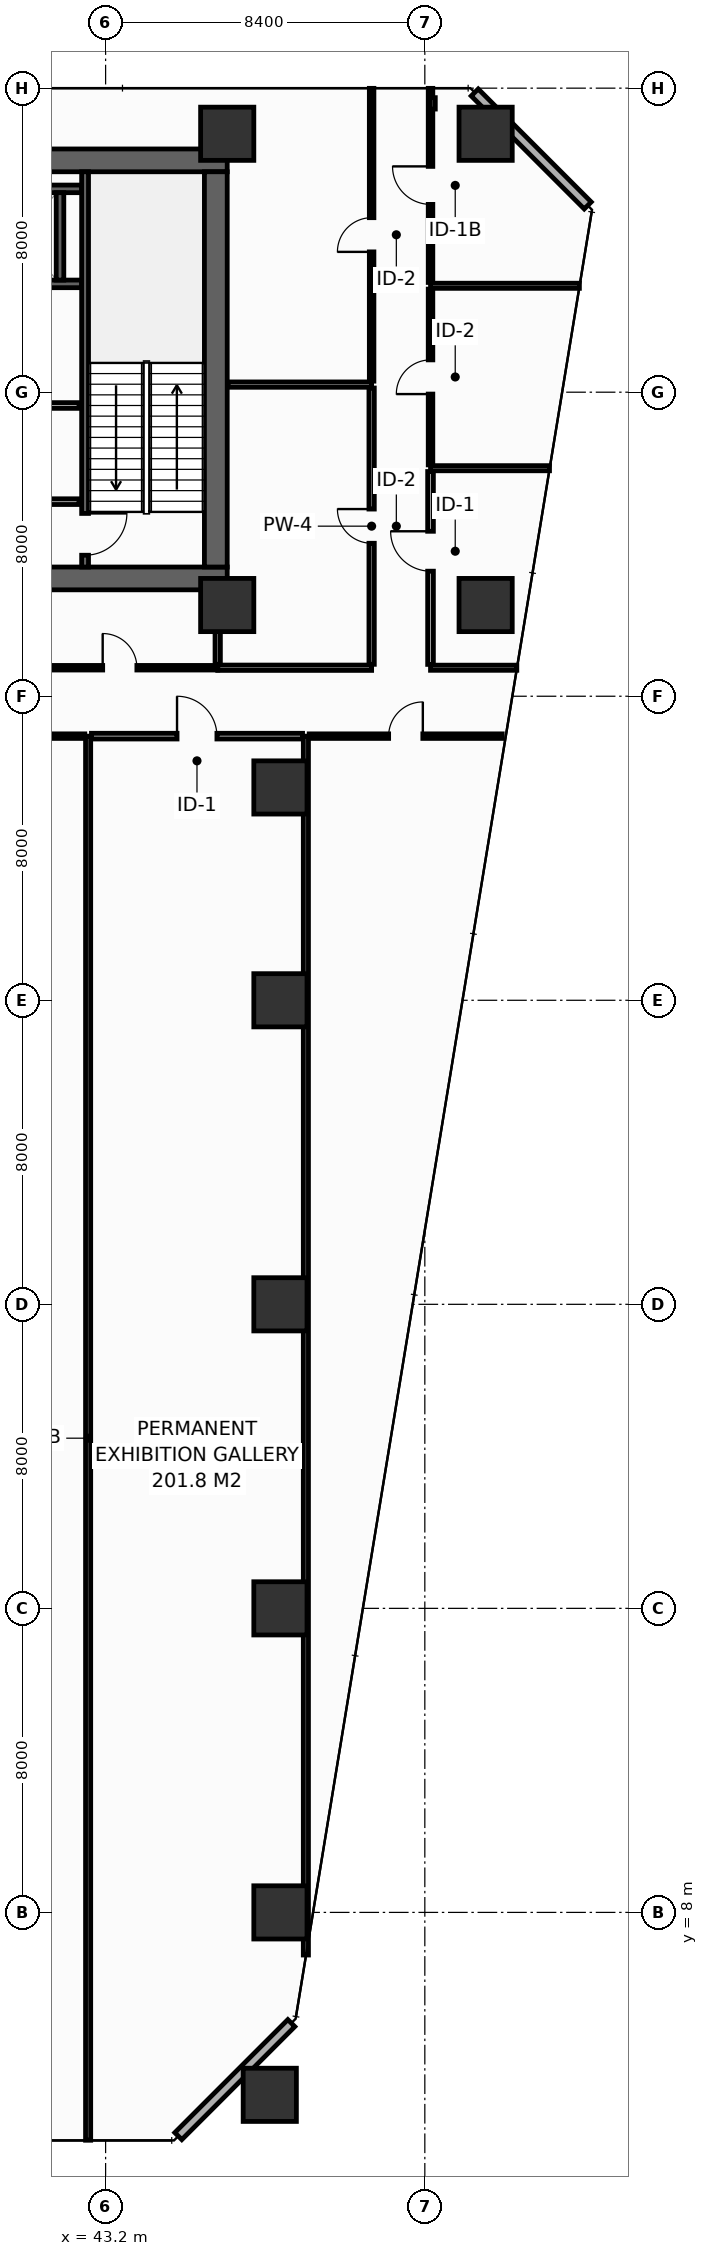
"""IFC4 building model, lengths in metres.
Left out: names, types, materials, properties, quantities, classifications, styles, units other than length and angle.
Written with IfcOpenShell. Run it as: python <this file> out.ifc"""

import sys

from ifc_helpers import new_model, si_unit, direction, frame, frame_2d, origin, origin_2d, place, context, subcontext, project, spatial, rectangle, hollow_rectangle, extrude, element, fill, save


model = new_model("IFC4")
c1 = context("Model", 3, precision=1e-05, world=origin(), true_north=direction((0.0, 1.0)))
c2 = subcontext(c1, "Body", "Model", "MODEL_VIEW")
j1 = project(units=[si_unit("LENGTHUNIT", "METRE"), si_unit("PLANEANGLEUNIT", "RADIAN")], contexts=[c1])
p1 = place(None, origin())
s1 = spatial("IfcSite", under=j1, at=p1, CompositionType="ELEMENT")
p2 = place(p1, origin())
s2 = spatial("IfcBuilding", under=s1, at=p2, CompositionType="ELEMENT")
p3 = place(p2, frame((0.0, 0.0, 33.0)))
s3 = spatial("IfcBuildingStorey", under=s2, at=p3, CompositionType="ELEMENT", Elevation=33.0)
p4 = place(p3, frame((13.5, 43.1, 0.0), z_axis=(0.0, 0.0, 1.0), x_axis=(1.0, 0.0, 0.0)))
e1 = element("IfcWall", 1, at=p4, inside=s3, PredefinedType="SHEAR", context=c2, shape_type="SweptSolid", body=[
    extrude(rectangle(XDim=32.9, YDim=0.6, at=frame_2d((16.45, 0.0))), origin(), (0.0, 0.0, 1.0), 4.95),
])
p5 = place(p4, frame((5.4, 0.0, 0.0)))
e2 = element("IfcOpeningElement", 2, at=p5, cuts=e1, PredefinedType="OPENING", context=c2, shape_type="SweptSolid", body=[
    extrude(rectangle(XDim=1.1, YDim=2.15, at=frame_2d((0.55, 1.075))), frame((0.0, 0.31, 0.0), z_axis=(0.0, -1.0, 0.0), x_axis=(1.0, 0.0, 0.0)), (0.0, 0.0, 1.0), 0.62),
])
p6 = place(p4, frame((25.6, 0.0, 0.0)))
e3 = element("IfcOpeningElement", 3, at=p6, cuts=e1, PredefinedType="OPENING", context=c2, shape_type="SweptSolid", body=[
    extrude(rectangle(XDim=1.1, YDim=2.15, at=frame_2d((0.55, 1.075))), frame((0.0, 0.31, 0.0), z_axis=(0.0, -1.0, 0.0), x_axis=(1.0, 0.0, 0.0)), (0.0, 0.0, 1.0), 0.62),
])
p7 = place(p3, frame((13.5, 54.1, 0.0), z_axis=(0.0, 0.0, 1.0), x_axis=(1.0, 0.0, 0.0)))
e4 = element("IfcWall", 4, at=p7, inside=s3, PredefinedType="SHEAR", context=c2, shape_type="SweptSolid", body=[
    extrude(rectangle(XDim=32.9, YDim=0.6, at=frame_2d((16.45, 0.0))), origin(), (0.0, 0.0, 1.0), 4.95),
])
p8 = place(p3, frame((46.1, 43.4, 0.0), z_axis=(0.0, 0.0, 1.0), x_axis=(0.0, 1.0, 0.0)))
e5 = element("IfcWall", 5, at=p8, inside=s3, PredefinedType="SHEAR", context=c2, shape_type="SweptSolid", body=[
    extrude(rectangle(XDim=10.4, YDim=0.6, at=frame_2d((5.2, 0.0))), origin(), (0.0, 0.0, 1.0), 4.95),
])
for number, where, z_axis, x_axis in (
    (6, (46.4, 54.8, 0.0), (0.0, 0.0, 1.0), (1.0, 0.0, 0.0)),
    (7, (53.2, 54.8, 0.0), (0.0, 0.0, 1.0), (1.0, 0.0, 0.0)),
    (8, (46.4, 42.4, 0.0), (0.0, 0.0, 1.0), (1.0, 0.0, 0.0)),
    (9, (53.2, 42.4, 0.0), (0.0, 0.0, 1.0), (1.0, 0.0, 0.0)),
    (10, (47.52, 3.2, 0.0), (0.0, 0.0, 1.0), (1.0, 0.0, 0.0)),
    (11, (47.8, 8.0, 0.0), (0.0, 0.0, 1.0), (1.0, 0.0, 0.0)),
    (12, (47.8, 16.0, 0.0), (0.0, 0.0, 1.0), (1.0, 0.0, 0.0)),
    (13, (47.8, 24.0, 0.0), (0.0, 0.0, 1.0), (1.0, 0.0, 0.0)),
    (14, (47.8, 32.0, 0.0), (0.0, 0.0, 1.0), (1.0, 0.0, 0.0)),
    (15, (47.8, 37.6, 0.0), (0.0, 0.0, 1.0), (1.0, 0.0, 0.0)),
):
    element("IfcColumn", number, at=place(p3, frame(where, z_axis=z_axis, x_axis=x_axis)), inside=s3, PredefinedType="COLUMN", context=c2, shape_type="SweptSolid", body=[
        extrude(hollow_rectangle(XDim=1.4, YDim=1.4, WallThickness=0.065, at=origin_2d()), origin(), (0.0, 0.0, 1.0), 5.4),
    ])
p9 = place(p3, frame((51.8, 55.6, 0.0), z_axis=(0.0, 0.0, 1.0), x_axis=(1.0, 0.0, 0.0)))
e16 = element("IfcColumn", 16, at=p9, inside=s3, PredefinedType="PILASTER", context=c2, shape_type="SweptSolid", body=[
    extrude(hollow_rectangle(XDim=0.15, YDim=0.3, WallThickness=0.01, at=origin_2d()), origin(), (0.0, 0.0, 1.0), 5.4),
])
for number, where, z_axis, x_axis in (
    (17, (39.525, 50.85, 0.0), (0.0, 0.0, 1.0), (1.0, 0.0, 0.0)),
    (18, (39.525, 53.35, 0.0), (0.0, 0.0, 1.0), (1.0, 0.0, 0.0)),
):
    element("IfcWall", number, at=place(p3, frame(where, z_axis=z_axis, x_axis=x_axis)), inside=s3, PredefinedType="SHEAR", context=c2, shape_type="SweptSolid", body=[
        extrude(rectangle(XDim=3.045, YDim=0.2, at=frame_2d((1.522, 0.0))), origin(), (0.0, 0.0, 1.0), 4.95),
    ])
p10 = place(p3, frame((42.0, 50.95, 0.0), z_axis=(0.0, 0.0, 1.0), x_axis=(0.0, 1.0, 0.0)))
e19 = element("IfcWall", 19, at=p10, inside=s3, PredefinedType="SHEAR", context=c2, shape_type="SweptSolid", body=[
    extrude(rectangle(XDim=2.3, YDim=0.2, at=frame_2d((1.15, 0.0))), origin(), (0.0, 0.0, 1.0), 4.95),
])
p11 = place(p3, frame((42.66, 53.8, 0.0), z_axis=(0.0, 0.0, 1.0), x_axis=(0.0, -1.0, 0.0)))
e20 = element("IfcWall", 20, at=p11, inside=s3, PredefinedType="SHEAR", context=c2, shape_type="SweptSolid", body=[
    extrude(rectangle(XDim=10.4, YDim=0.18, at=frame_2d((5.2, 0.0))), origin(), (0.0, 0.0, 1.0), 4.95),
])
p12 = place(p11, frame((8.99, 0.0, 0.0)))
e21 = element("IfcOpeningElement", 21, at=p12, cuts=e20, PredefinedType="OPENING", context=c2, shape_type="SweptSolid", body=[
    extrude(rectangle(XDim=1.1, YDim=2.15, at=frame_2d((0.55, 1.075))), frame((0.0, 0.1, 0.0), z_axis=(0.0, -1.0, 0.0), x_axis=(1.0, 0.0, 0.0)), (0.0, 0.0, 1.0), 0.2),
])
p13 = place(p3, frame((33.95, 45.12, 0.0), z_axis=(0.0, 0.0, 1.0), x_axis=(1.0, 0.0, 0.0)))
e22 = element("IfcWall", 22, at=p13, inside=s3, PredefinedType="PARTITIONING", context=c2, shape_type="SweptSolid", body=[
    extrude(rectangle(XDim=8.55, YDim=0.15, at=frame_2d((4.275, 0.0))), origin(), (0.0, 0.0, 1.0), 4.95),
])
p14 = place(p13, frame((0.95, 0.0, 0.0)))
e23 = element("IfcOpeningElement", 23, at=p14, cuts=e22, PredefinedType="OPENING", context=c2, shape_type="SweptSolid", body=[
    extrude(rectangle(XDim=0.95, YDim=2.15, at=frame_2d((0.475, 1.075))), frame((0.0, 0.085, 0.0), z_axis=(0.0, -1.0, 0.0), x_axis=(1.0, 0.0, 0.0)), (0.0, 0.0, 1.0), 0.17),
])
p15 = place(p13, frame((3.8, 0.0, 0.0)))
e24 = element("IfcOpeningElement", 24, at=p15, cuts=e22, PredefinedType="OPENING", context=c2, shape_type="SweptSolid", body=[
    extrude(rectangle(XDim=0.95, YDim=2.15, at=frame_2d((0.475, 1.075))), frame((0.0, 0.085, 0.0), z_axis=(0.0, -1.0, 0.0), x_axis=(1.0, 0.0, 0.0)), (0.0, 0.0, 1.0), 0.17),
])
p16 = place(p13, frame((6.65, 0.0, 0.0)))
e25 = element("IfcOpeningElement", 25, at=p16, cuts=e22, PredefinedType="OPENING", context=c2, shape_type="SweptSolid", body=[
    extrude(rectangle(XDim=0.95, YDim=2.15, at=frame_2d((0.475, 1.075))), frame((0.0, 0.085, 0.0), z_axis=(0.0, -1.0, 0.0), x_axis=(1.0, 0.0, 0.0)), (0.0, 0.0, 1.0), 0.17),
])
p17 = place(p3, frame((33.95, 47.65, 0.0), z_axis=(0.0, 0.0, 1.0), x_axis=(1.0, 0.0, 0.0)))
e26 = element("IfcWall", 26, at=p17, inside=s3, PredefinedType="PARTITIONING", context=c2, shape_type="SweptSolid", body=[
    extrude(rectangle(XDim=8.55, YDim=0.15, at=frame_2d((4.275, 0.0))), origin(), (0.0, 0.0, 1.0), 4.95),
])
for number, where, z_axis, x_axis in (
    (27, (45.113, 2.113, 0.0), (0.0, 0.0, 1.0), (0.707, 0.707, 0.0)),
    (28, (55.887, 52.913, 0.0), (0.0, 0.0, 1.0), (-0.707, 0.707, 0.0)),
):
    element("IfcWall", number, at=place(p3, frame(where, z_axis=z_axis, x_axis=x_axis)), inside=s3, PredefinedType="STANDARD", context=c2, shape_type="SweptSolid", body=[
        extrude(rectangle(XDim=4.206, YDim=0.26, at=frame_2d((2.103, 0.0))), origin(), (0.0, 0.0, 1.0), 4.95),
    ])
p18 = place(p3, frame((46.15, 40.75, 0.0), z_axis=(0.0, 0.0, 1.0), x_axis=(1.0, 0.0, 0.0)))
e29 = element("IfcWall", 29, at=p18, inside=s3, PredefinedType="PARTITIONING", context=c2, shape_type="SweptSolid", body=[
    extrude(rectangle(XDim=4.05, YDim=0.14, at=frame_2d((2.025, 0.0))), origin(), (0.0, 0.0, 1.0), 4.95),
])
p19 = place(p3, frame((46.15, 40.84, 0.0), z_axis=(0.0, 0.0, 1.0), x_axis=(0.0, 1.0, 0.0)))
e30 = element("IfcWall", 30, at=p19, inside=s3, PredefinedType="PARTITIONING", context=c2, shape_type="SweptSolid", body=[
    extrude(rectangle(XDim=1.94, YDim=0.14, at=frame_2d((0.97, 0.0))), origin(), (0.0, 0.0, 1.0), 4.95),
])
p20 = place(p3, frame((46.42, 48.2, 0.0), z_axis=(0.0, 0.0, 1.0), x_axis=(1.0, 0.0, 0.0)))
e31 = element("IfcWall", 31, at=p20, inside=s3, PredefinedType="PARTITIONING", context=c2, shape_type="SweptSolid", body=[
    extrude(rectangle(XDim=3.78, YDim=0.14, at=frame_2d((1.89, 0.0))), origin(), (0.0, 0.0, 1.0), 4.95),
])
p21 = place(p3, frame((50.2, 40.84, 0.0), z_axis=(0.0, 0.0, 1.0), x_axis=(0.0, 1.0, 0.0)))
e32 = element("IfcWall", 32, at=p21, inside=s3, PredefinedType="PARTITIONING", context=c2, shape_type="SweptSolid", body=[
    extrude(rectangle(XDim=7.27, YDim=0.14, at=frame_2d((3.635, 0.0))), origin(), (0.0, 0.0, 1.0), 4.135),
])
p22 = place(p21, frame((3.185, 0.0, 0.0)))
e33 = element("IfcOpeningElement", 33, at=p22, cuts=e32, PredefinedType="OPENING", context=c2, shape_type="SweptSolid", body=[
    extrude(rectangle(XDim=0.9, YDim=2.1, at=frame_2d((0.45, 1.05))), frame((0.0, 0.08, 0.0), z_axis=(0.0, -1.0, 0.0), x_axis=(1.0, 0.0, 0.0)), (0.0, 0.0, 1.0), 0.16),
])
p23 = place(p3, frame((50.2, 48.29, 0.0), z_axis=(0.0, 0.0, 1.0), x_axis=(0.0, 1.0, 0.0)))
e34 = element("IfcWall", 34, at=p23, inside=s3, PredefinedType="PARTITIONING", context=c2, shape_type="SweptSolid", body=[
    extrude(rectangle(XDim=7.705, YDim=0.12, at=frame_2d((3.853, 0.0))), origin(), (0.0, 0.0, 1.0), 4.235),
])
p24 = place(p23, frame((3.402, 0.0, 0.0)))
e35 = element("IfcOpeningElement", 35, at=p24, cuts=e34, PredefinedType="OPENING", context=c2, shape_type="SweptSolid", body=[
    extrude(rectangle(XDim=0.9, YDim=2.1, at=frame_2d((0.45, 1.05))), frame((0.0, 0.07, 0.0), z_axis=(0.0, -1.0, 0.0), x_axis=(1.0, 0.0, 0.0)), (0.0, 0.0, 1.0), 0.14),
])
p25 = place(p3, frame((51.75, 40.75, 0.0), z_axis=(0.0, 0.0, 1.0), x_axis=(1.0, 0.0, 0.0)))
e36 = element("IfcWall", 36, at=p25, inside=s3, PredefinedType="PARTITIONING", context=c2, shape_type="SweptSolid", body=[
    extrude(rectangle(XDim=2.271, YDim=0.135, at=frame_2d((1.135, 0.0))), origin(), (0.0, 0.0, 1.0), 3.135),
])
p26 = place(p3, frame((51.75, 46.0, 0.0), z_axis=(0.0, 0.0, 1.0), x_axis=(1.0, 0.0, 0.0)))
e37 = element("IfcWall", 37, at=p26, inside=s3, PredefinedType="PARTITIONING", context=c2, shape_type="SweptSolid", body=[
    extrude(rectangle(XDim=3.131, YDim=0.135, at=frame_2d((1.565, 0.0))), origin(), (0.0, 0.0, 1.0), 4.135),
])
p27 = place(p3, frame((51.75, 50.8, 0.0), z_axis=(0.0, 0.0, 1.0), x_axis=(1.0, 0.0, 0.0)))
e38 = element("IfcWall", 38, at=p27, inside=s3, PredefinedType="PARTITIONING", context=c2, shape_type="SweptSolid", body=[
    extrude(rectangle(XDim=3.917, YDim=0.135, at=frame_2d((1.958, 0.0))), origin(), (0.0, 0.0, 1.0), 4.135),
])
p28 = place(p3, frame((51.75, 40.837, 0.0), z_axis=(0.0, 0.0, 1.0), x_axis=(0.0, 1.0, 0.0)))
e39 = element("IfcWall", 39, at=p28, inside=s3, PredefinedType="PARTITIONING", context=c2, shape_type="SweptSolid", body=[
    extrude(rectangle(XDim=5.075, YDim=0.15, at=frame_2d((2.538, 0.0))), origin(), (0.0, 0.0, 1.0), 3.535),
])
p29 = place(p28, frame((2.453, 0.0, 0.0)))
e40 = element("IfcOpeningElement", 40, at=p29, cuts=e39, PredefinedType="OPENING", context=c2, shape_type="SweptSolid", body=[
    extrude(rectangle(XDim=1.05, YDim=2.15, at=frame_2d((0.525, 1.075))), frame((0.0, 0.085, 0.0), z_axis=(0.0, -1.0, 0.0), x_axis=(1.0, 0.0, 0.0)), (0.0, 0.0, 1.0), 0.17),
])
p30 = place(p3, frame((51.75, 46.087, 0.0), z_axis=(0.0, 0.0, 1.0), x_axis=(0.0, 1.0, 0.0)))
e41 = element("IfcWall", 41, at=p30, inside=s3, PredefinedType="PARTITIONING", context=c2, shape_type="SweptSolid", body=[
    extrude(rectangle(XDim=4.625, YDim=0.12, at=frame_2d((2.312, 0.0))), origin(), (0.0, 0.0, 1.0), 4.95),
])
p31 = place(p30, frame((1.863, 0.0, 0.0)))
e42 = element("IfcOpeningElement", 42, at=p31, cuts=e41, PredefinedType="OPENING", context=c2, shape_type="SweptSolid", body=[
    extrude(rectangle(XDim=0.9, YDim=2.1, at=frame_2d((0.45, 1.05))), frame((0.0, 0.07, 0.0), z_axis=(0.0, -1.0, 0.0), x_axis=(1.0, 0.0, 0.0)), (0.0, 0.0, 1.0), 0.14),
])
p32 = place(p3, frame((51.75, 50.887, 0.0), z_axis=(0.0, 0.0, 1.0), x_axis=(0.0, 1.0, 0.0)))
e43 = element("IfcWall", 43, at=p32, inside=s3, PredefinedType="PARTITIONING", context=c2, shape_type="SweptSolid", body=[
    extrude(rectangle(XDim=5.108, YDim=0.12, at=frame_2d((2.554, 0.0))), origin(), (0.0, 0.0, 1.0), 4.235),
])
p33 = place(p32, frame((2.054, 0.0, 0.0)))
e44 = element("IfcOpeningElement", 44, at=p33, cuts=e43, PredefinedType="OPENING", context=c2, shape_type="SweptSolid", body=[
    extrude(rectangle(XDim=1.0, YDim=2.15, at=frame_2d((0.5, 1.075))), frame((0.0, 0.07, 0.0), z_axis=(0.0, -1.0, 0.0), x_axis=(1.0, 0.0, 0.0)), (0.0, 0.0, 1.0), 0.14),
])
p34 = place(p3, frame((40.995, 40.75, 0.0), z_axis=(0.0, 0.0, 1.0), x_axis=(1.0, 0.0, 0.0)))
e45 = element("IfcWall", 45, at=p34, inside=s3, PredefinedType="PARTITIONING", context=c2, shape_type="SweptSolid", body=[
    extrude(rectangle(XDim=5.155, YDim=0.12, at=frame_2d((2.577, 0.0))), origin(), (0.0, 0.0, 1.0), 4.95),
])
p35 = place(p34, frame((2.128, 0.0, 0.0)))
e46 = element("IfcOpeningElement", 46, at=p35, cuts=e45, PredefinedType="OPENING", context=c2, shape_type="SweptSolid", body=[
    extrude(rectangle(XDim=0.9, YDim=2.1, at=frame_2d((0.45, 1.05))), frame((0.0, 0.07, 0.0), z_axis=(0.0, -1.0, 0.0), x_axis=(1.0, 0.0, 0.0)), (0.0, 0.0, 1.0), 0.14),
])
p36 = place(p3, frame((42.74, 2.005, 0.0), z_axis=(0.0, 0.0, 1.0), x_axis=(0.0, 1.0, 0.0)))
e47 = element("IfcWall", 47, at=p36, inside=s3, PredefinedType="PARTITIONING", context=c2, shape_type="SweptSolid", body=[
    extrude(rectangle(XDim=36.945, YDim=0.135, at=frame_2d((18.473, 0.0))), origin(), (0.0, 0.0, 1.0), 3.135),
])
p37 = place(p3, frame((48.47, 6.879, 0.0), z_axis=(0.0, 0.0, 1.0), x_axis=(0.0, 1.0, 0.0)))
e48 = element("IfcWall", 48, at=p37, inside=s3, PredefinedType="PARTITIONING", context=c2, shape_type="SweptSolid", body=[
    extrude(rectangle(XDim=32.071, YDim=0.135, at=frame_2d((16.036, 0.0))), origin(), (0.0, 0.0, 1.0), 3.135),
])
p38 = place(p3, frame((36.15, 38.95, 0.0), z_axis=(0.0, 0.0, 1.0), x_axis=(1.0, 0.0, 0.0)))
e49 = element("IfcWall", 49, at=p38, inside=s3, PredefinedType="PARTITIONING", context=c2, shape_type="SweptSolid", body=[
    extrude(rectangle(XDim=6.503, YDim=0.12, at=frame_2d((3.251, 0.0))), origin(), (0.0, 0.0, 1.0), 3.535),
])
p39 = place(p38, frame((2.801, 0.0, 0.0)))
e50 = element("IfcOpeningElement", 50, at=p39, cuts=e49, PredefinedType="OPENING", context=c2, shape_type="SweptSolid", body=[
    extrude(rectangle(XDim=0.9, YDim=2.1, at=frame_2d((0.45, 1.05))), frame((0.0, 0.07, 0.0), z_axis=(0.0, -1.0, 0.0), x_axis=(1.0, 0.0, 0.0)), (0.0, 0.0, 1.0), 0.14),
])
p40 = place(p3, frame((42.827, 38.95, 0.0), z_axis=(0.0, 0.0, 1.0), x_axis=(1.0, 0.0, 0.0)))
e51 = element("IfcWall", 51, at=p40, inside=s3, PredefinedType="PARTITIONING", context=c2, shape_type="SweptSolid", body=[
    extrude(rectangle(XDim=5.555, YDim=0.15, at=frame_2d((2.778, 0.0))), origin(), (0.0, 0.0, 1.0), 4.95),
])
p41 = place(p40, frame((2.252, 0.0, 0.0)))
e52 = element("IfcOpeningElement", 52, at=p41, cuts=e51, PredefinedType="OPENING", context=c2, shape_type="SweptSolid", body=[
    extrude(rectangle(XDim=1.05, YDim=2.15, at=frame_2d((0.525, 1.075))), frame((0.0, 0.085, 0.0), z_axis=(0.0, -1.0, 0.0), x_axis=(1.0, 0.0, 0.0)), (0.0, 0.0, 1.0), 0.17),
])
p42 = place(p3, frame((48.558, 38.95, 0.0), z_axis=(0.0, 0.0, 1.0), x_axis=(1.0, 0.0, 0.0)))
e53 = element("IfcWall", 53, at=p42, inside=s3, PredefinedType="PARTITIONING", context=c2, shape_type="SweptSolid", body=[
    extrude(rectangle(XDim=5.08, YDim=0.12, at=frame_2d((2.54, 0.0))), origin(), (0.0, 0.0, 1.0), 3.135),
])
p43 = place(p42, frame((2.09, 0.0, 0.0)))
e54 = element("IfcOpeningElement", 54, at=p43, cuts=e53, PredefinedType="OPENING", context=c2, shape_type="SweptSolid", body=[
    extrude(rectangle(XDim=0.9, YDim=2.1, at=frame_2d((0.45, 1.05))), frame((0.0, 0.07, 0.0), z_axis=(0.0, -1.0, 0.0), x_axis=(1.0, 0.0, 0.0)), (0.0, 0.0, 1.0), 0.14),
])
p44 = place(p12, origin())
e55 = element("IfcDoor", 55, at=p44, inside=s3, OperationType="SINGLE_SWING_LEFT", PredefinedType="DOOR", context=c2, shape_type="SweptSolid", body=[
    extrude(rectangle(XDim=1.1, YDim=2.15, at=frame_2d((0.55, 1.075))), frame((0.0, 0.025, 0.0), z_axis=(0.0, -1.0, 0.0), x_axis=(1.0, 0.0, 0.0)), (0.0, 0.0, 1.0), 0.05),
])
fill(e21, e55)
p45 = place(p22, origin())
e56 = element("IfcDoor", 56, at=p45, inside=s3, OperationType="SINGLE_SWING_RIGHT", PredefinedType="DOOR", context=c2, shape_type="SweptSolid", body=[
    extrude(rectangle(XDim=0.9, YDim=2.1, at=frame_2d((0.45, 1.05))), frame((0.0, 0.025, 0.0), z_axis=(0.0, -1.0, 0.0), x_axis=(1.0, 0.0, 0.0)), (0.0, 0.0, 1.0), 0.05),
])
fill(e33, e56)
p46 = place(p24, origin())
e57 = element("IfcDoor", 57, at=p46, inside=s3, OperationType="SINGLE_SWING_LEFT", PredefinedType="DOOR", context=c2, shape_type="SweptSolid", body=[
    extrude(rectangle(XDim=0.9, YDim=2.1, at=frame_2d((0.45, 1.05))), frame((0.0, 0.025, 0.0), z_axis=(0.0, -1.0, 0.0), x_axis=(1.0, 0.0, 0.0)), (0.0, 0.0, 1.0), 0.05),
])
fill(e35, e57)
p47 = place(p29, origin())
e58 = element("IfcDoor", 58, at=p47, inside=s3, OperationType="SINGLE_SWING_RIGHT", PredefinedType="DOOR", context=c2, shape_type="SweptSolid", body=[
    extrude(rectangle(XDim=1.05, YDim=2.15, at=frame_2d((0.525, 1.075))), frame((0.0, 0.025, 0.0), z_axis=(0.0, -1.0, 0.0), x_axis=(1.0, 0.0, 0.0)), (0.0, 0.0, 1.0), 0.05),
])
fill(e40, e58)
p48 = place(p31, origin())
e59 = element("IfcDoor", 59, at=p48, inside=s3, OperationType="SINGLE_SWING_LEFT", PredefinedType="DOOR", context=c2, shape_type="SweptSolid", body=[
    extrude(rectangle(XDim=0.9, YDim=2.1, at=frame_2d((0.45, 1.05))), frame((0.0, 0.025, 0.0), z_axis=(0.0, -1.0, 0.0), x_axis=(1.0, 0.0, 0.0)), (0.0, 0.0, 1.0), 0.05),
])
fill(e42, e59)
p49 = place(p33, origin())
e60 = element("IfcDoor", 60, at=p49, inside=s3, OperationType="SINGLE_SWING_RIGHT", PredefinedType="DOOR", context=c2, shape_type="SweptSolid", body=[
    extrude(rectangle(XDim=1.0, YDim=2.15, at=frame_2d((0.5, 1.075))), frame((0.0, 0.025, 0.0), z_axis=(0.0, -1.0, 0.0), x_axis=(1.0, 0.0, 0.0)), (0.0, 0.0, 1.0), 0.05),
])
fill(e44, e60)
p50 = place(p35, origin())
e61 = element("IfcDoor", 61, at=p50, inside=s3, OperationType="SINGLE_SWING_LEFT", PredefinedType="DOOR", context=c2, shape_type="SweptSolid", body=[
    extrude(rectangle(XDim=0.9, YDim=2.1, at=frame_2d((0.45, 1.05))), frame((0.0, 0.025, 0.0), z_axis=(0.0, -1.0, 0.0), x_axis=(1.0, 0.0, 0.0)), (0.0, 0.0, 1.0), 0.05),
])
fill(e46, e61)
p51 = place(p41, origin())
e62 = element("IfcDoor", 62, at=p51, inside=s3, OperationType="SINGLE_SWING_LEFT", PredefinedType="DOOR", context=c2, shape_type="SweptSolid", body=[
    extrude(rectangle(XDim=1.05, YDim=2.15, at=frame_2d((0.525, 1.075))), frame((0.0, 0.025, 0.0), z_axis=(0.0, -1.0, 0.0), x_axis=(1.0, 0.0, 0.0)), (0.0, 0.0, 1.0), 0.05),
])
fill(e52, e62)
p52 = place(p43, origin())
e63 = element("IfcDoor", 63, at=p52, inside=s3, OperationType="SINGLE_SWING_RIGHT", PredefinedType="DOOR", context=c2, shape_type="SweptSolid", body=[
    extrude(rectangle(XDim=0.9, YDim=2.1, at=frame_2d((0.45, 1.05))), frame((0.0, 0.025, 0.0), z_axis=(0.0, -1.0, 0.0), x_axis=(1.0, 0.0, 0.0)), (0.0, 0.0, 1.0), 0.05),
])
fill(e54, e63)
save(model, sys.argv[1])
